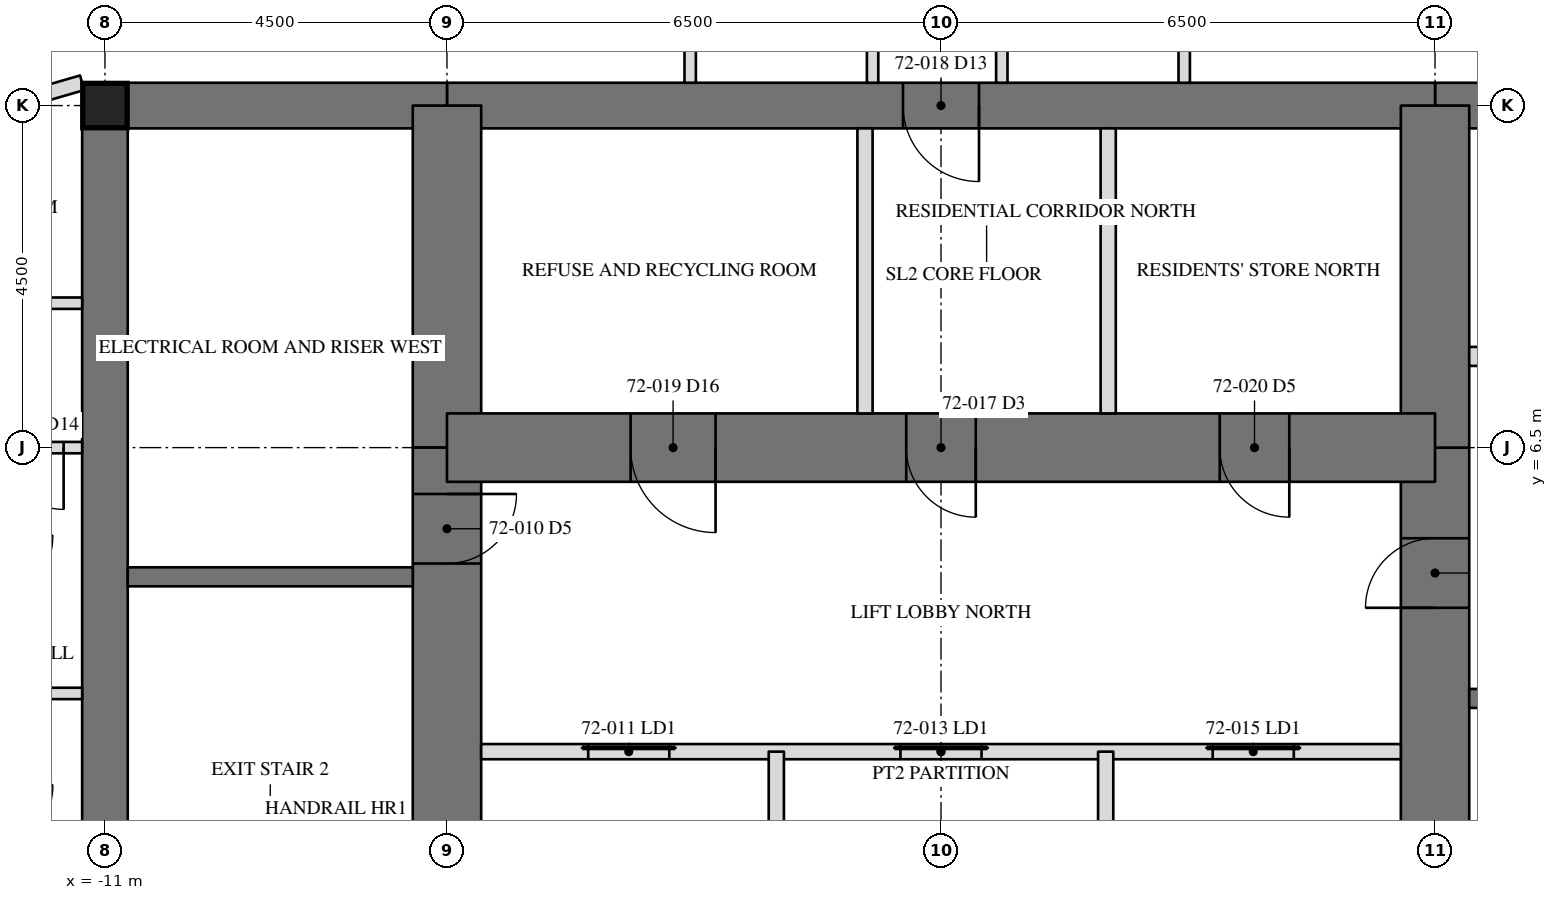
"""IFC4 building model, lengths in metres.
Left out: names, types, materials, properties, quantities, classifications, styles, units other than length and angle.
Written with IfcOpenShell. Run it as: python <this file> out.ifc"""

import sys

from ifc_helpers import new_model, si_unit, direction, frame, frame_2d, origin, origin_2d, place, context, subcontext, project, spatial, rectangle, hollow_rectangle, extrude, element, fill, save


model = new_model("IFC4")
c1 = context("Model", 3, precision=1e-05, world=origin(), true_north=direction((0.0, 1.0)))
c2 = subcontext(c1, "Body", "Model", "MODEL_VIEW")
j1 = project(units=[si_unit("LENGTHUNIT", "METRE"), si_unit("PLANEANGLEUNIT", "RADIAN")], contexts=[c1])
p1 = place(None, origin())
s1 = spatial("IfcSite", under=j1, at=p1, CompositionType="ELEMENT")
p2 = place(p1, origin())
s2 = spatial("IfcBuilding", under=s1, at=p2, CompositionType="ELEMENT")
p3 = place(p2, frame((0.0, 0.0, 292.0)))
s3 = spatial("IfcBuildingStorey", under=s2, at=p3, CompositionType="ELEMENT", Elevation=292.0)
p4 = place(p3, frame((-11.0, 11.0, 0.0), z_axis=(0.0, 0.0, 1.0), x_axis=(0.0, -1.0, 0.0)))
e1 = element("IfcWall", 1, at=p4, inside=s3, PredefinedType="SHEAR", context=c2, shape_type="SweptSolid", body=[
    extrude(rectangle(XDim=22.0, YDim=0.6, at=frame_2d((11.0, 0.0))), origin(), (0.0, 0.0, 1.0), 3.6),
])
p5 = place(p4, frame((15.393, 0.0, 0.0)))
e2 = element("IfcOpeningElement", 2, at=p5, cuts=e1, PredefinedType="OPENING", context=c2, shape_type="SweptSolid", body=[
    extrude(rectangle(XDim=0.915, YDim=2.134, at=frame_2d((0.458, 1.067))), frame((0.0, 0.31, 0.0), z_axis=(0.0, -1.0, 0.0), x_axis=(1.0, 0.0, 0.0)), (0.0, 0.0, 1.0), 0.62),
])
p6 = place(p3, frame((11.0, 11.0, 0.0), z_axis=(0.0, 0.0, 1.0), x_axis=(-1.0, 0.0, 0.0)))
e3 = element("IfcWall", 3, at=p6, inside=s3, PredefinedType="SHEAR", context=c2, shape_type="SweptSolid", body=[
    extrude(rectangle(XDim=4.5, YDim=0.6, at=frame_2d((2.25, 0.0))), origin(), (0.0, 0.0, 1.0), 3.6),
])
p7 = place(p3, frame((6.5, 11.0, 0.0), z_axis=(0.0, 0.0, 1.0), x_axis=(-1.0, 0.0, 0.0)))
e4 = element("IfcWall", 4, at=p7, inside=s3, PredefinedType="SHEAR", context=c2, shape_type="SweptSolid", body=[
    extrude(rectangle(XDim=13.0, YDim=0.6, at=frame_2d((6.5, 0.0))), origin(), (0.0, 0.0, 1.0), 3.6),
])
p8 = place(p7, frame((6.0, 0.0, 0.0)))
e5 = element("IfcOpeningElement", 5, at=p8, cuts=e4, PredefinedType="OPENING", context=c2, shape_type="SweptSolid", body=[
    extrude(rectangle(XDim=1.0, YDim=2.134, at=frame_2d((0.5, 1.067))), frame((0.0, 0.31, 0.0), z_axis=(0.0, -1.0, 0.0), x_axis=(1.0, 0.0, 0.0)), (0.0, 0.0, 1.0), 0.62),
])
p9 = place(p3, frame((-6.5, 11.0, 0.0), z_axis=(0.0, 0.0, 1.0), x_axis=(-1.0, 0.0, 0.0)))
e6 = element("IfcWall", 6, at=p9, inside=s3, PredefinedType="SHEAR", context=c2, shape_type="SweptSolid", body=[
    extrude(rectangle(XDim=4.5, YDim=0.6, at=frame_2d((2.25, 0.0))), origin(), (0.0, 0.0, 1.0), 3.6),
])
p10 = place(p3, frame((6.5, -6.5, 0.0), z_axis=(0.0, 0.0, 1.0), x_axis=(0.0, 1.0, 0.0)))
e7 = element("IfcWall", 7, at=p10, inside=s3, PredefinedType="SHEAR", context=c2, shape_type="SweptSolid", body=[
    extrude(rectangle(XDim=13.0, YDim=0.9, at=frame_2d((6.5, 0.0))), origin(), (0.0, 0.0, 1.0), 3.6),
])
p11 = place(p10, frame((10.893, 0.0, 0.0)))
e8 = element("IfcOpeningElement", 8, at=p11, cuts=e7, PredefinedType="OPENING", context=c2, shape_type="SweptSolid", body=[
    extrude(rectangle(XDim=0.915, YDim=2.134, at=frame_2d((0.458, 1.067))), frame((0.0, 0.46, 0.0), z_axis=(0.0, -1.0, 0.0), x_axis=(1.0, 0.0, 0.0)), (0.0, 0.0, 1.0), 0.92),
])
p12 = place(p10, frame((0.61, 0.0, 0.0)))
e9 = element("IfcOpeningElement", 9, at=p12, cuts=e7, PredefinedType="OPENING", context=c2, shape_type="SweptSolid", body=[
    extrude(rectangle(XDim=0.915, YDim=2.134, at=frame_2d((0.458, 1.067))), frame((0.0, 0.46, 0.0), z_axis=(0.0, -1.0, 0.0), x_axis=(1.0, 0.0, 0.0)), (0.0, 0.0, 1.0), 0.92),
])
for number, where, z_axis, x_axis in (
    (10, (6.5, 6.5, 0.0), (0.0, 0.0, 1.0), (0.0, 1.0, 0.0)),
    (11, (-6.5, 11.0, 0.0), (0.0, 0.0, 1.0), (0.0, -1.0, 0.0)),
):
    element("IfcWall", number, at=place(p3, frame(where, z_axis=z_axis, x_axis=x_axis)), inside=s3, PredefinedType="SHEAR", context=c2, shape_type="SweptSolid", body=[
        extrude(rectangle(XDim=4.5, YDim=0.9, at=frame_2d((2.25, 0.0))), origin(), (0.0, 0.0, 1.0), 3.6),
    ])
p13 = place(p3, frame((-6.5, 6.5, 0.0), z_axis=(0.0, 0.0, 1.0), x_axis=(0.0, -1.0, 0.0)))
e12 = element("IfcWall", 12, at=p13, inside=s3, PredefinedType="SHEAR", context=c2, shape_type="SweptSolid", body=[
    extrude(rectangle(XDim=13.0, YDim=0.9, at=frame_2d((6.5, 0.0))), origin(), (0.0, 0.0, 1.0), 3.6),
])
p14 = place(p13, frame((10.893, 0.0, 0.0)))
e13 = element("IfcOpeningElement", 13, at=p14, cuts=e12, PredefinedType="OPENING", context=c2, shape_type="SweptSolid", body=[
    extrude(rectangle(XDim=0.915, YDim=2.134, at=frame_2d((0.458, 1.067))), frame((0.0, 0.46, 0.0), z_axis=(0.0, -1.0, 0.0), x_axis=(1.0, 0.0, 0.0)), (0.0, 0.0, 1.0), 0.92),
])
p15 = place(p13, frame((0.61, 0.0, 0.0)))
e14 = element("IfcOpeningElement", 14, at=p15, cuts=e12, PredefinedType="OPENING", context=c2, shape_type="SweptSolid", body=[
    extrude(rectangle(XDim=0.915, YDim=2.134, at=frame_2d((0.458, 1.067))), frame((0.0, 0.46, 0.0), z_axis=(0.0, -1.0, 0.0), x_axis=(1.0, 0.0, 0.0)), (0.0, 0.0, 1.0), 0.92),
])
p16 = place(p3, frame((6.5, 6.5, 0.0), z_axis=(0.0, 0.0, 1.0), x_axis=(-1.0, 0.0, 0.0)))
e15 = element("IfcWall", 15, at=p16, inside=s3, PredefinedType="SHEAR", context=c2, shape_type="SweptSolid", body=[
    extrude(rectangle(XDim=13.0, YDim=0.9, at=frame_2d((6.5, 0.0))), origin(), (0.0, 0.0, 1.0), 3.6),
])
p17 = place(p16, frame((6.042, 0.0, 0.0)))
e16 = element("IfcOpeningElement", 16, at=p17, cuts=e15, PredefinedType="OPENING", context=c2, shape_type="SweptSolid", body=[
    extrude(rectangle(XDim=0.915, YDim=2.134, at=frame_2d((0.458, 1.067))), frame((0.0, 0.46, 0.0), z_axis=(0.0, -1.0, 0.0), x_axis=(1.0, 0.0, 0.0)), (0.0, 0.0, 1.0), 0.92),
])
p18 = place(p16, frame((9.466, 0.0, 0.0)))
e17 = element("IfcOpeningElement", 17, at=p18, cuts=e15, PredefinedType="OPENING", context=c2, shape_type="SweptSolid", body=[
    extrude(rectangle(XDim=1.118, YDim=2.134, at=frame_2d((0.559, 1.067))), frame((0.0, 0.46, 0.0), z_axis=(0.0, -1.0, 0.0), x_axis=(1.0, 0.0, 0.0)), (0.0, 0.0, 1.0), 0.92),
])
p19 = place(p16, frame((1.917, 0.0, 0.0)))
e18 = element("IfcOpeningElement", 18, at=p19, cuts=e15, PredefinedType="OPENING", context=c2, shape_type="SweptSolid", body=[
    extrude(rectangle(XDim=0.915, YDim=2.134, at=frame_2d((0.458, 1.067))), frame((0.0, 0.46, 0.0), z_axis=(0.0, -1.0, 0.0), x_axis=(1.0, 0.0, 0.0)), (0.0, 0.0, 1.0), 0.92),
])
p20 = place(p3, frame((-11.0, 11.0, 0.0), z_axis=(0.0, 0.0, 1.0), x_axis=(1.0, 0.0, 0.0)))
e19 = element("IfcColumn", 19, at=p20, inside=s3, PredefinedType="COLUMN", context=c2, shape_type="SweptSolid", body=[
    extrude(hollow_rectangle(XDim=0.584, YDim=0.584, WallThickness=0.051, at=origin_2d()), origin(), (0.0, 0.0, 1.0), 3.6),
])
p21 = place(p3, frame((-6.95, 4.8, 0.0), z_axis=(0.0, 0.0, 1.0), x_axis=(-1.0, 0.0, 0.0)))
e20 = element("IfcWall", 20, at=p21, inside=s3, PredefinedType="SOLIDWALL", context=c2, shape_type="SweptSolid", body=[
    extrude(rectangle(XDim=3.75, YDim=0.25, at=frame_2d((1.875, 0.0))), origin(), (0.0, 0.0, 1.0), 3.41),
])
p22 = place(p3, frame((6.95, 3.2, 0.0), z_axis=(0.0, 0.0, 1.0), x_axis=(1.0, 0.0, 0.0)))
e21 = element("IfcWall", 21, at=p22, inside=s3, PredefinedType="SOLIDWALL", context=c2, shape_type="SweptSolid", body=[
    extrude(rectangle(XDim=3.75, YDim=0.25, at=frame_2d((1.875, 0.0))), origin(), (0.0, 0.0, 1.0), 3.41),
])
p23 = place(p22, frame((1.342, 0.0, 0.0)))
e22 = element("IfcOpeningElement", 22, at=p23, cuts=e21, PredefinedType="OPENING", context=c2, shape_type="SweptSolid", body=[
    extrude(rectangle(XDim=1.067, YDim=2.134, at=frame_2d((0.533, 1.067))), frame((0.0, 0.135, 0.0), z_axis=(0.0, -1.0, 0.0), x_axis=(1.0, 0.0, 0.0)), (0.0, 0.0, 1.0), 0.27),
])
p24 = place(p3, frame((6.95, 7.7, 0.0), z_axis=(0.0, 0.0, 1.0), x_axis=(1.0, 0.0, 0.0)))
e23 = element("IfcWall", 23, at=p24, inside=s3, PredefinedType="PARTITIONING", context=c2, shape_type="SweptSolid", body=[
    extrude(rectangle(XDim=3.75, YDim=0.25, at=frame_2d((1.875, 0.0))), origin(), (0.0, 0.0, 1.0), 3.41),
])
p25 = place(p24, frame((0.45, 0.0, 0.0)))
e24 = element("IfcOpeningElement", 24, at=p25, cuts=e23, PredefinedType="OPENING", context=c2, shape_type="SweptSolid", body=[
    extrude(rectangle(XDim=1.219, YDim=2.134, at=frame_2d((0.609, 1.067))), frame((0.0, 0.135, 0.0), z_axis=(0.0, -1.0, 0.0), x_axis=(1.0, 0.0, 0.0)), (0.0, 0.0, 1.0), 0.27),
])
p26 = place(p3, frame((-6.05, 2.5, 0.0), z_axis=(0.0, 0.0, 1.0), x_axis=(1.0, 0.0, 0.0)))
e25 = element("IfcWall", 25, at=p26, inside=s3, PredefinedType="PARTITIONING", context=c2, shape_type="SweptSolid", body=[
    extrude(rectangle(XDim=12.1, YDim=0.2, at=frame_2d((6.05, 0.0))), origin(), (0.0, 0.0, 1.0), 3.41),
])
p27 = place(p26, frame((1.408, 0.0, 0.0)))
e26 = element("IfcOpeningElement", 26, at=p27, cuts=e25, PredefinedType="OPENING", context=c2, shape_type="SweptSolid", body=[
    extrude(rectangle(XDim=1.067, YDim=2.134, at=frame_2d((0.533, 1.067))), frame((0.0, 0.11, 0.0), z_axis=(0.0, -1.0, 0.0), x_axis=(1.0, 0.0, 0.0)), (0.0, 0.0, 1.0), 0.22),
])
p28 = place(p26, frame((5.517, 0.0, 0.0)))
e27 = element("IfcOpeningElement", 27, at=p28, cuts=e25, PredefinedType="OPENING", context=c2, shape_type="SweptSolid", body=[
    extrude(rectangle(XDim=1.067, YDim=2.134, at=frame_2d((0.533, 1.067))), frame((0.0, 0.11, 0.0), z_axis=(0.0, -1.0, 0.0), x_axis=(1.0, 0.0, 0.0)), (0.0, 0.0, 1.0), 0.22),
])
p29 = place(p26, frame((9.625, 0.0, 0.0)))
e28 = element("IfcOpeningElement", 28, at=p29, cuts=e25, PredefinedType="OPENING", context=c2, shape_type="SweptSolid", body=[
    extrude(rectangle(XDim=1.067, YDim=2.134, at=frame_2d((0.533, 1.067))), frame((0.0, 0.11, 0.0), z_axis=(0.0, -1.0, 0.0), x_axis=(1.0, 0.0, 0.0)), (0.0, 0.0, 1.0), 0.22),
])
for number, where, z_axis, x_axis in (
    (29, (-2.167, -2.5, 0.0), (0.0, 0.0, 1.0), (0.0, 1.0, 0.0)),
    (30, (2.167, -2.5, 0.0), (0.0, 0.0, 1.0), (0.0, 1.0, 0.0)),
):
    element("IfcWall", number, at=place(p3, frame(where, z_axis=z_axis, x_axis=x_axis)), inside=s3, PredefinedType="PARTITIONING", context=c2, shape_type="SweptSolid", body=[
        extrude(rectangle(XDim=5.0, YDim=0.2, at=frame_2d((2.5, 0.0))), origin(), (0.0, 0.0, 1.0), 3.41),
    ])
for number, where, z_axis, x_axis in (
    (31, (-1.0, 6.95, 0.0), (0.0, 0.0, 1.0), (0.0, 1.0, 0.0)),
    (32, (2.2, 6.95, 0.0), (0.0, 0.0, 1.0), (0.0, 1.0, 0.0)),
):
    element("IfcWall", number, at=place(p3, frame(where, z_axis=z_axis, x_axis=x_axis)), inside=s3, PredefinedType="PARTITIONING", context=c2, shape_type="SweptSolid", body=[
        extrude(rectangle(XDim=3.75, YDim=0.2, at=frame_2d((1.875, 0.0))), origin(), (0.0, 0.0, 1.0), 3.41),
    ])
p30 = place(p3, frame((-11.3, 11.3, 0.0), z_axis=(0.0, 0.0, 1.0), x_axis=(-0.960552344683, -0.278099250491, 0.0)))
e33 = element("IfcWall", 33, at=p30, inside=s3, PredefinedType="PARTITIONING", context=c2, shape_type="SweptSolid", body=[
    extrude(rectangle(XDim=1.584, YDim=0.2, at=frame_2d((0.792, 0.0))), origin(), (0.0, 0.0, 1.0), 3.41),
])
p31 = place(p3, frame((-0.9, 11.3, 0.0), z_axis=(0.0, 0.0, 1.0), x_axis=(0.0, 1.0, 0.0)))
e34 = element("IfcWall", 34, at=p31, inside=s3, PredefinedType="PARTITIONING", context=c2, shape_type="SweptSolid", body=[
    extrude(rectangle(XDim=2.725, YDim=0.15, at=frame_2d((1.362, 0.0))), origin(), (0.0, 0.0, 1.0), 3.41),
])
p32 = place(p3, frame((-3.3, 11.3, 0.0), z_axis=(0.0, 0.0, 1.0), x_axis=(0.0, 1.0, 0.0)))
e35 = element("IfcWall", 35, at=p32, inside=s3, PredefinedType="PARTITIONING", context=c2, shape_type="SweptSolid", body=[
    extrude(rectangle(XDim=2.725, YDim=0.15, at=frame_2d((1.362, 0.0))), origin(), (0.0, 0.0, 1.0), 2.709),
])
p33 = place(p3, frame((3.2, 11.3, 0.0), z_axis=(0.0, 0.0, 1.0), x_axis=(0.0, 1.0, 0.0)))
e36 = element("IfcWall", 36, at=p33, inside=s3, PredefinedType="PARTITIONING", context=c2, shape_type="SweptSolid", body=[
    extrude(rectangle(XDim=2.375, YDim=0.15, at=frame_2d((1.188, 0.0))), origin(), (0.0, 0.0, 1.0), 2.709),
])
p34 = place(p3, frame((0.8, 11.3, 0.0), z_axis=(0.0, 0.0, 1.0), x_axis=(0.0, 1.0, 0.0)))
e37 = element("IfcWall", 37, at=p34, inside=s3, PredefinedType="PARTITIONING", context=c2, shape_type="SweptSolid", body=[
    extrude(rectangle(XDim=2.375, YDim=0.15, at=frame_2d((1.188, 0.0))), origin(), (0.0, 0.0, 1.0), 3.41),
])
p35 = place(p3, frame((-11.3, 6.5, 0.0), z_axis=(0.0, 0.0, 1.0), x_axis=(-1.0, 0.0, 0.0)))
e38 = element("IfcWall", 38, at=p35, inside=s3, PredefinedType="PARTITIONING", context=c2, shape_type="SweptSolid", body=[
    extrude(rectangle(XDim=5.615, YDim=0.15, at=frame_2d((2.808, 0.0))), origin(), (0.0, 0.0, 1.0), 2.966),
])
p36 = place(p35, frame((0.243, 0.0, 0.0)))
e39 = element("IfcOpeningElement", 39, at=p36, cuts=e38, PredefinedType="OPENING", context=c2, shape_type="SweptSolid", body=[
    extrude(rectangle(XDim=0.813, YDim=2.032, at=frame_2d((0.406, 1.016))), frame((0.0, 0.085, 0.0), z_axis=(0.0, -1.0, 0.0), x_axis=(1.0, 0.0, 0.0)), (0.0, 0.0, 1.0), 0.17),
])
p37 = place(p35, frame((2.742, 0.0, 0.0)))
e40 = element("IfcOpeningElement", 40, at=p37, cuts=e38, PredefinedType="OPENING", context=c2, shape_type="SweptSolid", body=[
    extrude(rectangle(XDim=0.915, YDim=2.134, at=frame_2d((0.458, 1.067))), frame((0.0, 0.085, 0.0), z_axis=(0.0, -1.0, 0.0), x_axis=(1.0, 0.0, 0.0)), (0.0, 0.0, 1.0), 0.17),
])
p38 = place(p3, frame((-11.3, 3.266, 0.0), z_axis=(0.0, 0.0, 1.0), x_axis=(-1.0, 0.0, 0.0)))
e41 = element("IfcWall", 41, at=p38, inside=s3, PredefinedType="PARTITIONING", context=c2, shape_type="SweptSolid", body=[
    extrude(rectangle(XDim=5.615, YDim=0.15, at=frame_2d((2.808, 0.0))), origin(), (0.0, 0.0, 1.0), 2.709),
])
p39 = place(p3, frame((-11.3, 8.4, 0.0), z_axis=(0.0, 0.0, 1.0), x_axis=(-1.0, 0.0, 0.0)))
e42 = element("IfcWall", 42, at=p39, inside=s3, PredefinedType="PARTITIONING", context=c2, shape_type="SweptSolid", body=[
    extrude(rectangle(XDim=2.325, YDim=0.15, at=frame_2d((1.163, 0.0))), origin(), (0.0, 0.0, 1.0), 3.41),
])
p40 = place(p11, origin())
e43 = element("IfcDoor", 43, at=p40, inside=s3, OperationType="SINGLE_SWING_RIGHT", PredefinedType="DOOR", context=c2, shape_type="SweptSolid", body=[
    extrude(rectangle(XDim=0.915, YDim=2.134, at=frame_2d((0.458, 1.067))), frame((0.0, -0.375, 0.0), z_axis=(0.0, -1.0, 0.0), x_axis=(1.0, 0.0, 0.0)), (0.0, 0.0, 1.0), 0.05),
])
fill(e8, e43)
p41 = place(p15, origin())
e44 = element("IfcDoor", 44, at=p41, inside=s3, OperationType="SINGLE_SWING_RIGHT", PredefinedType="DOOR", context=c2, shape_type="SweptSolid", body=[
    extrude(rectangle(XDim=0.915, YDim=2.134, at=frame_2d((0.458, 1.067))), frame((0.0, -0.375, 0.0), z_axis=(0.0, -1.0, 0.0), x_axis=(1.0, 0.0, 0.0)), (0.0, 0.0, 1.0), 0.05),
])
fill(e14, e44)
p42 = place(p27, origin())
e45 = element("IfcDoor", 45, at=p42, inside=s3, OperationType="SLIDING_TO_LEFT", PredefinedType="DOOR", context=c2, shape_type="SweptSolid", body=[
    extrude(rectangle(XDim=1.067, YDim=2.134, at=frame_2d((0.533, 1.067))), frame((0.0, 0.025, 0.0), z_axis=(0.0, -1.0, 0.0), x_axis=(1.0, 0.0, 0.0)), (0.0, 0.0, 1.0), 0.05),
])
fill(e26, e45)
p43 = place(p28, origin())
e46 = element("IfcDoor", 46, at=p43, inside=s3, OperationType="SLIDING_TO_LEFT", PredefinedType="DOOR", context=c2, shape_type="SweptSolid", body=[
    extrude(rectangle(XDim=1.067, YDim=2.134, at=frame_2d((0.533, 1.067))), frame((0.0, 0.025, 0.0), z_axis=(0.0, -1.0, 0.0), x_axis=(1.0, 0.0, 0.0)), (0.0, 0.0, 1.0), 0.05),
])
fill(e27, e46)
p44 = place(p29, origin())
e47 = element("IfcDoor", 47, at=p44, inside=s3, OperationType="SLIDING_TO_LEFT", PredefinedType="DOOR", context=c2, shape_type="SweptSolid", body=[
    extrude(rectangle(XDim=1.067, YDim=2.134, at=frame_2d((0.533, 1.067))), frame((0.0, 0.025, 0.0), z_axis=(0.0, -1.0, 0.0), x_axis=(1.0, 0.0, 0.0)), (0.0, 0.0, 1.0), 0.05),
])
fill(e28, e47)
p45 = place(p17, origin())
e48 = element("IfcDoor", 48, at=p45, inside=s3, OperationType="SINGLE_SWING_RIGHT", PredefinedType="DOOR", context=c2, shape_type="SweptSolid", body=[
    extrude(rectangle(XDim=0.915, YDim=2.134, at=frame_2d((0.458, 1.067))), frame((0.0, -0.375, 0.0), z_axis=(0.0, -1.0, 0.0), x_axis=(1.0, 0.0, 0.0)), (0.0, 0.0, 1.0), 0.05),
])
fill(e16, e48)
p46 = place(p8, origin())
e49 = element("IfcDoor", 49, at=p46, inside=s3, OperationType="SINGLE_SWING_RIGHT", PredefinedType="DOOR", context=c2, shape_type="SweptSolid", body=[
    extrude(rectangle(XDim=1.0, YDim=2.134, at=frame_2d((0.5, 1.067))), frame((0.0, -0.225, 0.0), z_axis=(0.0, -1.0, 0.0), x_axis=(1.0, 0.0, 0.0)), (0.0, 0.0, 1.0), 0.05),
])
fill(e5, e49)
p47 = place(p18, origin())
e50 = element("IfcDoor", 50, at=p47, inside=s3, OperationType="SINGLE_SWING_RIGHT", PredefinedType="DOOR", context=c2, shape_type="SweptSolid", body=[
    extrude(rectangle(XDim=1.118, YDim=2.134, at=frame_2d((0.559, 1.067))), frame((0.0, -0.375, 0.0), z_axis=(0.0, -1.0, 0.0), x_axis=(1.0, 0.0, 0.0)), (0.0, 0.0, 1.0), 0.05),
])
fill(e17, e50)
p48 = place(p19, origin())
e51 = element("IfcDoor", 51, at=p48, inside=s3, OperationType="SINGLE_SWING_RIGHT", PredefinedType="DOOR", context=c2, shape_type="SweptSolid", body=[
    extrude(rectangle(XDim=0.915, YDim=2.134, at=frame_2d((0.458, 1.067))), frame((0.0, -0.375, 0.0), z_axis=(0.0, -1.0, 0.0), x_axis=(1.0, 0.0, 0.0)), (0.0, 0.0, 1.0), 0.05),
])
fill(e18, e51)
p49 = place(p36, origin())
e52 = element("IfcDoor", 52, at=p49, inside=s3, OperationType="SINGLE_SWING_LEFT", PredefinedType="DOOR", context=c2, shape_type="SweptSolid", body=[
    extrude(rectangle(XDim=0.813, YDim=2.032, at=frame_2d((0.406, 1.016))), frame((0.0, 0.025, 0.0), z_axis=(0.0, -1.0, 0.0), x_axis=(1.0, 0.0, 0.0)), (0.0, 0.0, 1.0), 0.05),
])
fill(e39, e52)
save(model, sys.argv[1])
